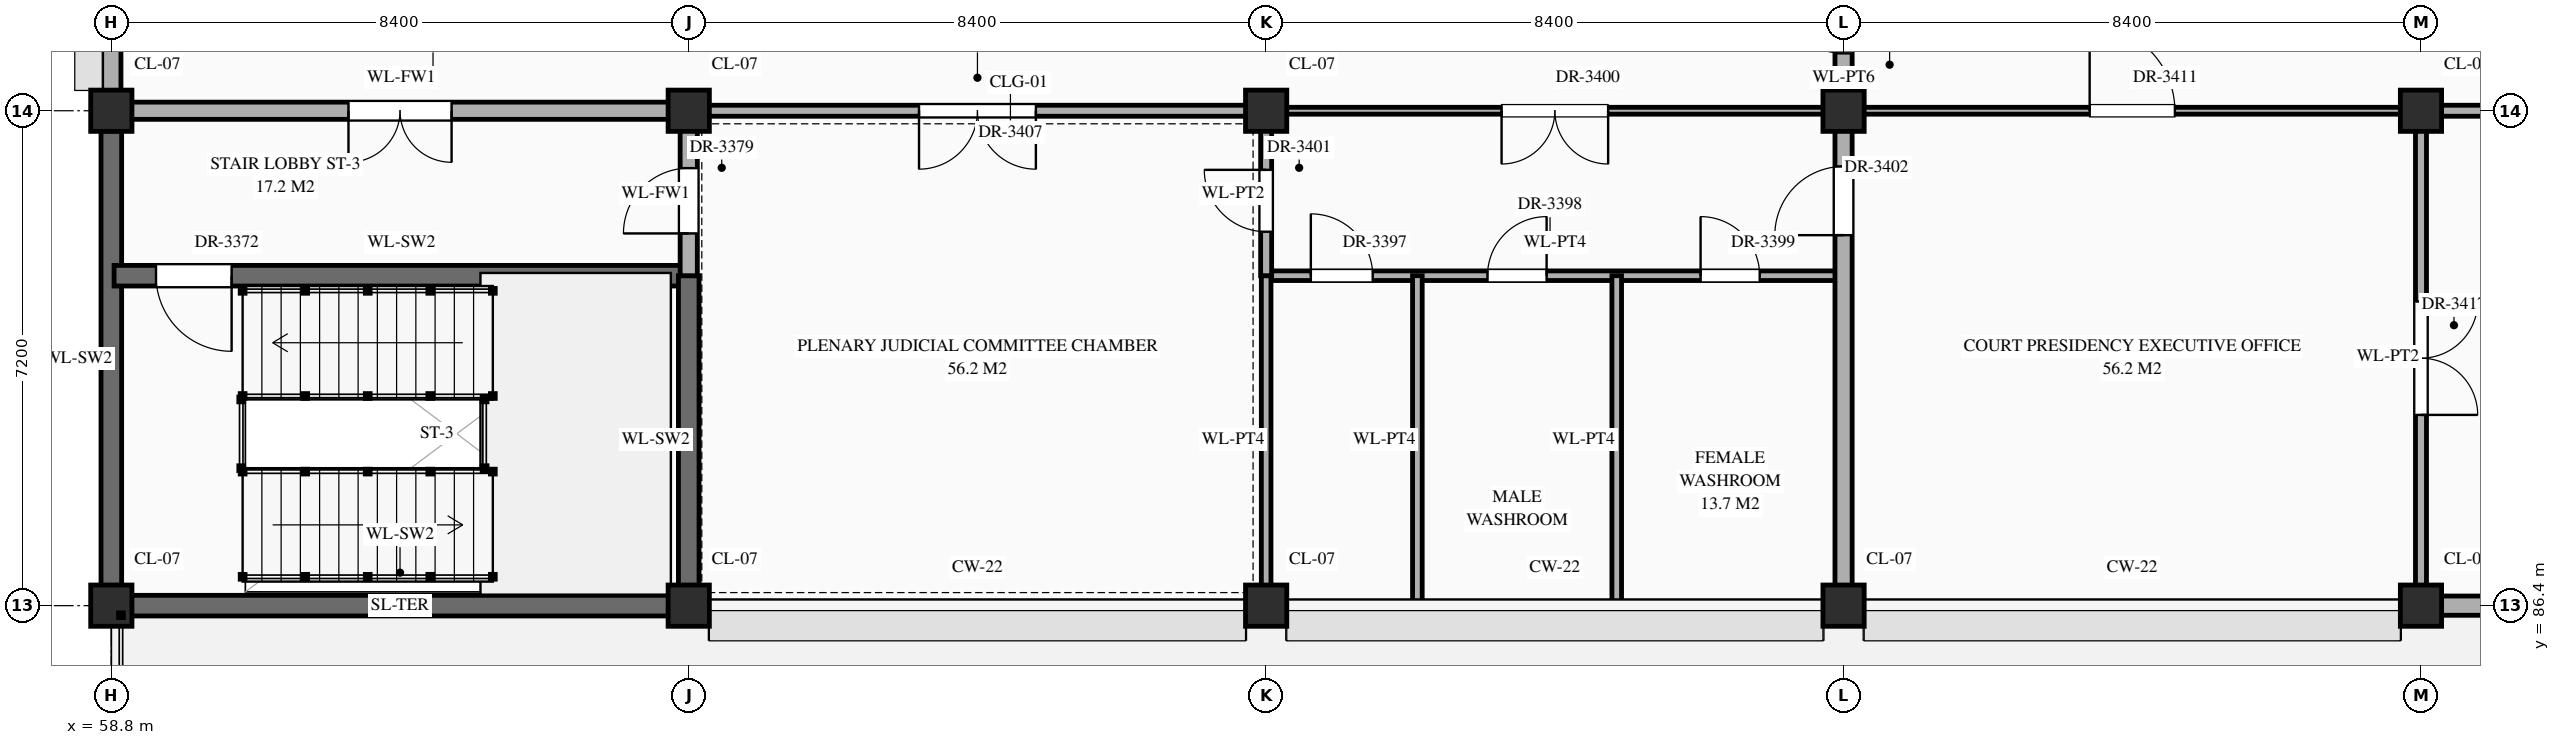
"""IFC4 building model, lengths in metres.
Left out: names, types, materials, properties, quantities, classifications, styles, units other than length and angle.
Written with IfcOpenShell. Run it as: python <this file> out.ifc"""

import sys

from ifc_helpers import new_model, si_unit, direction, frame, frame_2d, origin, origin_2d, place, context, subcontext, project, spatial, rectangle, extrude, element, fill, save


model = new_model("IFC4")
c1 = context("Model", 3, precision=1e-05, world=origin(), true_north=direction((0.0, 1.0)))
c2 = subcontext(c1, "Body", "Model", "MODEL_VIEW")
j1 = project(units=[si_unit("LENGTHUNIT", "METRE"), si_unit("PLANEANGLEUNIT", "RADIAN")], contexts=[c1])
p1 = place(None, origin())
s1 = spatial("IfcSite", under=j1, at=p1, CompositionType="ELEMENT")
p2 = place(p1, origin())
s2 = spatial("IfcBuilding", under=s1, at=p2, CompositionType="ELEMENT")
p3 = place(p2, frame((0.0, 0.0, 68.7)))
s3 = spatial("IfcBuildingStorey", under=s2, at=p3, CompositionType="ELEMENT", Elevation=68.7)
for number, where, z_axis, x_axis in (
    (1, (58.8, 86.4, 0.0), (0.0, 0.0, 1.0), (1.0, 0.0, 0.0)),
    (2, (58.8, 93.6, 0.0), (0.0, 0.0, 1.0), (1.0, 0.0, 0.0)),
    (3, (67.2, 86.4, 0.0), (0.0, 0.0, 1.0), (1.0, 0.0, 0.0)),
    (4, (67.2, 93.6, 0.0), (0.0, 0.0, 1.0), (1.0, 0.0, 0.0)),
    (5, (75.6, 86.4, 0.0), (0.0, 0.0, 1.0), (1.0, 0.0, 0.0)),
    (6, (75.6, 93.6, 0.0), (0.0, 0.0, 1.0), (1.0, 0.0, 0.0)),
    (7, (84.0, 86.4, 0.0), (0.0, 0.0, 1.0), (1.0, 0.0, 0.0)),
    (8, (84.0, 93.6, 0.0), (0.0, 0.0, 1.0), (1.0, 0.0, 0.0)),
    (9, (92.4, 86.4, 0.0), (0.0, 0.0, 1.0), (1.0, 0.0, 0.0)),
    (10, (92.4, 93.6, 0.0), (0.0, 0.0, 1.0), (1.0, 0.0, 0.0)),
):
    element("IfcColumn", number, at=place(p3, frame(where, z_axis=z_axis, x_axis=x_axis)), inside=s3, PredefinedType="COLUMN", context=c2, shape_type="SweptSolid", body=[
        extrude(rectangle(XDim=0.6, YDim=0.6, at=origin_2d()), origin(), (0.0, 0.0, 1.0), 4.5),
    ])
p4 = place(p3, frame((59.095, 86.4, 0.0), z_axis=(0.0, 0.0, 1.0), x_axis=(1.0, 0.0, 0.0)))
e11 = element("IfcWall", 11, at=p4, inside=s3, PredefinedType="SHEAR", context=c2, shape_type="SweptSolid", body=[
    extrude(rectangle(XDim=7.81, YDim=0.3, at=frame_2d((3.905, 0.0))), origin(), (0.0, 0.0, 1.0), 4.12),
])
p5 = place(p3, frame((58.8, 86.695, 0.0), z_axis=(0.0, 0.0, 1.0), x_axis=(0.0, 1.0, 0.0)))
e12 = element("IfcWall", 12, at=p5, inside=s3, PredefinedType="SHEAR", context=c2, shape_type="SweptSolid", body=[
    extrude(rectangle(XDim=6.61, YDim=0.3, at=frame_2d((3.305, 0.0))), origin(), (0.0, 0.0, 1.0), 4.12),
])
p6 = place(p3, frame((58.8, 93.895, 0.0), z_axis=(0.0, 0.0, 1.0), x_axis=(0.0, 1.0, 0.0)))
e13 = element("IfcWall", 13, at=p6, inside=s3, PredefinedType="STANDARD", context=c2, shape_type="SweptSolid", body=[
    extrude(rectangle(XDim=6.61, YDim=0.28, at=frame_2d((3.305, 0.0))), origin(), (0.0, 0.0, 1.0), 3.47),
])
p7 = place(p6, frame((4.005, 0.0, 0.85)))
e14 = element("IfcOpeningElement", 14, at=p7, cuts=e13, PredefinedType="OPENING", context=c2, shape_type="SweptSolid", body=[
    extrude(rectangle(XDim=1.2, YDim=1.56, at=frame_2d((0.6, 0.78))), frame((0.0, 0.152, 0.0), z_axis=(0.0, -1.0, 0.0), x_axis=(1.0, 0.0, 0.0)), (0.0, 0.0, 1.0), 0.304),
])
p8 = place(p3, frame((92.695, 86.4, 0.0), z_axis=(0.0, 0.0, 1.0), x_axis=(1.0, 0.0, 0.0)))
e15 = element("IfcWall", 15, at=p8, inside=s3, PredefinedType="STANDARD", context=c2, shape_type="SweptSolid", body=[
    extrude(rectangle(XDim=7.81, YDim=0.28, at=frame_2d((3.905, 0.0))), origin(), (0.0, 0.0, 1.0), 3.47),
])
p9 = place(p8, frame((3.005, 0.0, 0.0)))
e16 = element("IfcOpeningElement", 16, at=p9, cuts=e15, PredefinedType="OPENING", context=c2, shape_type="SweptSolid", body=[
    extrude(rectangle(XDim=1.8, YDim=2.25, at=frame_2d((0.9, 1.125))), frame((0.0, 0.152, 0.0), z_axis=(0.0, -1.0, 0.0), x_axis=(1.0, 0.0, 0.0)), (0.0, 0.0, 1.0), 0.304),
])
p10 = place(p3, frame((58.84, 91.2, 0.0), z_axis=(0.0, 0.0, 1.0), x_axis=(1.0, 0.0, 0.0)))
e17 = element("IfcWall", 17, at=p10, inside=s3, PredefinedType="SHEAR", context=c2, shape_type="SweptSolid", body=[
    extrude(rectangle(XDim=8.36, YDim=0.3, at=frame_2d((4.18, 0.0))), origin(), (0.0, 0.0, 1.0), 4.12),
])
p11 = place(p10, frame((0.61, 0.0, 0.0)))
e18 = element("IfcOpeningElement", 18, at=p11, cuts=e17, PredefinedType="OPENING", context=c2, shape_type="SweptSolid", body=[
    extrude(rectangle(XDim=1.1, YDim=2.2, at=frame_2d((0.55, 1.1))), frame((0.0, 0.162, 0.0), z_axis=(0.0, -1.0, 0.0), x_axis=(1.0, 0.0, 0.0)), (0.0, 0.0, 1.0), 0.324),
])
p12 = place(p3, frame((75.6, 91.2, 0.0), z_axis=(0.0, 0.0, 1.0), x_axis=(1.0, 0.0, 0.0)))
e19 = element("IfcWall", 19, at=p12, inside=s3, PredefinedType="STANDARD", context=c2, shape_type="SweptSolid", body=[
    extrude(rectangle(XDim=8.4, YDim=0.14, at=frame_2d((4.2, 0.0))), origin(), (0.0, 0.0, 1.0), 4.12),
])
p13 = place(p12, frame((0.65, 0.0, 0.0)))
e20 = element("IfcOpeningElement", 20, at=p13, cuts=e19, PredefinedType="OPENING", context=c2, shape_type="SweptSolid", body=[
    extrude(rectangle(XDim=0.9, YDim=2.15, at=frame_2d((0.45, 1.075))), frame((0.0, 0.082, 0.0), z_axis=(0.0, -1.0, 0.0), x_axis=(1.0, 0.0, 0.0)), (0.0, 0.0, 1.0), 0.164),
])
p14 = place(p12, frame((3.22, 0.0, 0.0)))
e21 = element("IfcOpeningElement", 21, at=p14, cuts=e19, PredefinedType="OPENING", context=c2, shape_type="SweptSolid", body=[
    extrude(rectangle(XDim=0.86, YDim=2.1, at=frame_2d((0.43, 1.05))), frame((0.0, 0.082, 0.0), z_axis=(0.0, -1.0, 0.0), x_axis=(1.0, 0.0, 0.0)), (0.0, 0.0, 1.0), 0.164),
])
p15 = place(p12, frame((6.32, 0.0, 0.0)))
e22 = element("IfcOpeningElement", 22, at=p15, cuts=e19, PredefinedType="OPENING", context=c2, shape_type="SweptSolid", body=[
    extrude(rectangle(XDim=0.86, YDim=2.1, at=frame_2d((0.43, 1.05))), frame((0.0, 0.082, 0.0), z_axis=(0.0, -1.0, 0.0), x_axis=(1.0, 0.0, 0.0)), (0.0, 0.0, 1.0), 0.164),
])
p16 = place(p3, frame((58.84, 93.6, 0.0), z_axis=(0.0, 0.0, 1.0), x_axis=(1.0, 0.0, 0.0)))
e23 = element("IfcWall", 23, at=p16, inside=s3, PredefinedType="STANDARD", context=c2, shape_type="SweptSolid", body=[
    extrude(rectangle(XDim=8.36, YDim=0.25, at=frame_2d((4.18, 0.0))), origin(), (0.0, 0.0, 1.0), 3.27),
])
p17 = place(p16, frame((3.41, 0.0, 0.0)))
e24 = element("IfcOpeningElement", 24, at=p17, cuts=e23, PredefinedType="OPENING", context=c2, shape_type="SweptSolid", body=[
    extrude(rectangle(XDim=1.5, YDim=2.25, at=frame_2d((0.75, 1.125))), frame((0.0, 0.137, 0.0), z_axis=(0.0, -1.0, 0.0), x_axis=(1.0, 0.0, 0.0)), (0.0, 0.0, 1.0), 0.274),
])
p18 = place(p3, frame((67.2, 93.6, 0.0), z_axis=(0.0, 0.0, 1.0), x_axis=(1.0, 0.0, 0.0)))
e25 = element("IfcWall", 25, at=p18, inside=s3, PredefinedType="STANDARD", context=c2, shape_type="SweptSolid", body=[
    extrude(rectangle(XDim=8.4, YDim=0.16, at=frame_2d((4.2, 0.0))), origin(), (0.0, 0.0, 1.0), 3.27),
])
p19 = place(p18, frame((3.35, 0.0, 0.0)))
e26 = element("IfcOpeningElement", 26, at=p19, cuts=e25, PredefinedType="OPENING", context=c2, shape_type="SweptSolid", body=[
    extrude(rectangle(XDim=1.7, YDim=2.45, at=frame_2d((0.85, 1.225))), frame((0.0, 0.092, 0.0), z_axis=(0.0, -1.0, 0.0), x_axis=(1.0, 0.0, 0.0)), (0.0, 0.0, 1.0), 0.184),
])
p20 = place(p3, frame((75.6, 93.6, 0.0), z_axis=(0.0, 0.0, 1.0), x_axis=(1.0, 0.0, 0.0)))
e27 = element("IfcWall", 27, at=p20, inside=s3, PredefinedType="STANDARD", context=c2, shape_type="SweptSolid", body=[
    extrude(rectangle(XDim=16.8, YDim=0.1, at=frame_2d((8.4, 0.0))), origin(), (0.0, 0.0, 1.0), 3.27),
])
p21 = place(p20, frame((3.425, 0.0, 0.0)))
e28 = element("IfcOpeningElement", 28, at=p21, cuts=e27, PredefinedType="OPENING", context=c2, shape_type="SweptSolid", body=[
    extrude(rectangle(XDim=1.55, YDim=2.35, at=frame_2d((0.775, 1.175))), frame((0.0, 0.062, 0.0), z_axis=(0.0, -1.0, 0.0), x_axis=(1.0, 0.0, 0.0)), (0.0, 0.0, 1.0), 0.124),
])
p22 = place(p20, frame((11.98, 0.0, 0.0)))
e29 = element("IfcOpeningElement", 29, at=p22, cuts=e27, PredefinedType="OPENING", context=c2, shape_type="SweptSolid", body=[
    extrude(rectangle(XDim=1.24, YDim=2.3, at=frame_2d((0.62, 1.15))), frame((0.0, 0.062, 0.0), z_axis=(0.0, -1.0, 0.0), x_axis=(1.0, 0.0, 0.0)), (0.0, 0.0, 1.0), 0.124),
])
p23 = place(p3, frame((92.4, 93.6, 0.0), z_axis=(0.0, 0.0, 1.0), x_axis=(1.0, 0.0, 0.0)))
e30 = element("IfcWall", 30, at=p23, inside=s3, PredefinedType="STANDARD", context=c2, shape_type="SweptSolid", body=[
    extrude(rectangle(XDim=8.4, YDim=0.16, at=frame_2d((4.2, 0.0))), origin(), (0.0, 0.0, 1.0), 3.27),
])
p24 = place(p23, frame((3.425, 0.0, 0.0)))
e31 = element("IfcOpeningElement", 31, at=p24, cuts=e30, PredefinedType="OPENING", context=c2, shape_type="SweptSolid", body=[
    extrude(rectangle(XDim=1.55, YDim=2.35, at=frame_2d((0.775, 1.175))), frame((0.0, 0.092, 0.0), z_axis=(0.0, -1.0, 0.0), x_axis=(1.0, 0.0, 0.0)), (0.0, 0.0, 1.0), 0.184),
])
p25 = place(p3, frame((67.2, 86.44, 0.0), z_axis=(0.0, 0.0, 1.0), x_axis=(0.0, 1.0, 0.0)))
e32 = element("IfcWall", 32, at=p25, inside=s3, PredefinedType="SHEAR", context=c2, shape_type="SweptSolid", body=[
    extrude(rectangle(XDim=4.76, YDim=0.3, at=frame_2d((2.38, 0.0))), origin(), (0.0, 0.0, 1.0), 4.12),
])
p26 = place(p3, frame((67.2, 91.2, 0.0), z_axis=(0.0, 0.0, 1.0), x_axis=(0.0, 1.0, 0.0)))
e33 = element("IfcWall", 33, at=p26, inside=s3, PredefinedType="STANDARD", context=c2, shape_type="SweptSolid", body=[
    extrude(rectangle(XDim=2.4, YDim=0.25, at=frame_2d((1.2, 0.0))), origin(), (0.0, 0.0, 1.0), 3.37),
])
p27 = place(p26, frame((0.615, 0.0, 0.0)))
e34 = element("IfcOpeningElement", 34, at=p27, cuts=e33, PredefinedType="OPENING", context=c2, shape_type="SweptSolid", body=[
    extrude(rectangle(XDim=0.95, YDim=2.15, at=frame_2d((0.475, 1.075))), frame((0.0, 0.137, 0.0), z_axis=(0.0, -1.0, 0.0), x_axis=(1.0, 0.0, 0.0)), (0.0, 0.0, 1.0), 0.274),
])
p28 = place(p3, frame((75.6, 86.44, 0.0), z_axis=(0.0, 0.0, 1.0), x_axis=(0.0, 1.0, 0.0)))
e35 = element("IfcWall", 35, at=p28, inside=s3, PredefinedType="STANDARD", context=c2, shape_type="SweptSolid", body=[
    extrude(rectangle(XDim=4.76, YDim=0.14, at=frame_2d((2.38, 0.0))), origin(), (0.0, 0.0, 1.0), 3.37),
])
p29 = place(p3, frame((75.6, 91.2, 0.0), z_axis=(0.0, 0.0, 1.0), x_axis=(0.0, 1.0, 0.0)))
e36 = element("IfcWall", 36, at=p29, inside=s3, PredefinedType="STANDARD", context=c2, shape_type="SweptSolid", body=[
    extrude(rectangle(XDim=2.4, YDim=0.16, at=frame_2d((1.2, 0.0))), origin(), (0.0, 0.0, 1.0), 3.37),
])
p30 = place(p29, frame((0.64, 0.0, 0.0)))
e37 = element("IfcOpeningElement", 37, at=p30, cuts=e36, PredefinedType="OPENING", context=c2, shape_type="SweptSolid", body=[
    extrude(rectangle(XDim=0.9, YDim=2.15, at=frame_2d((0.45, 1.075))), frame((0.0, 0.092, 0.0), z_axis=(0.0, -1.0, 0.0), x_axis=(1.0, 0.0, 0.0)), (0.0, 0.0, 1.0), 0.184),
])
for number, where, z_axis, x_axis in (
    (38, (77.8, 86.44, 0.0), (0.0, 0.0, 1.0), (0.0, 1.0, 0.0)),
    (39, (80.7, 86.44, 0.0), (0.0, 0.0, 1.0), (0.0, 1.0, 0.0)),
):
    element("IfcWall", number, at=place(p3, frame(where, z_axis=z_axis, x_axis=x_axis)), inside=s3, PredefinedType="STANDARD", context=c2, shape_type="SweptSolid", body=[
        extrude(rectangle(XDim=4.76, YDim=0.14, at=frame_2d((2.38, 0.0))), origin(), (0.0, 0.0, 1.0), 4.12),
    ])
p31 = place(p3, frame((84.0, 86.44, 0.0), z_axis=(0.0, 0.0, 1.0), x_axis=(0.0, 1.0, 0.0)))
e40 = element("IfcWall", 40, at=p31, inside=s3, PredefinedType="STANDARD", context=c2, shape_type="SweptSolid", body=[
    extrude(rectangle(XDim=17.96, YDim=0.25, at=frame_2d((8.98, 0.0))), origin(), (0.0, 0.0, 1.0), 3.37),
])
p32 = place(p31, frame((15.52, 0.0, 0.0)))
e41 = element("IfcOpeningElement", 41, at=p32, cuts=e40, PredefinedType="OPENING", context=c2, shape_type="SweptSolid", body=[
    extrude(rectangle(XDim=1.5, YDim=2.25, at=frame_2d((0.75, 1.125))), frame((0.0, 0.137, 0.0), z_axis=(0.0, -1.0, 0.0), x_axis=(1.0, 0.0, 0.0)), (0.0, 0.0, 1.0), 0.274),
])
p33 = place(p31, frame((5.35, 0.0, 0.0)))
e42 = element("IfcOpeningElement", 42, at=p33, cuts=e40, PredefinedType="OPENING", context=c2, shape_type="SweptSolid", body=[
    extrude(rectangle(XDim=1.0, YDim=2.2, at=frame_2d((0.5, 1.1))), frame((0.0, 0.137, 0.0), z_axis=(0.0, -1.0, 0.0), x_axis=(1.0, 0.0, 0.0)), (0.0, 0.0, 1.0), 0.274),
])
p34 = place(p31, frame((7.995, 0.0, 0.0)))
e43 = element("IfcOpeningElement", 43, at=p34, cuts=e40, PredefinedType="OPENING", context=c2, shape_type="SweptSolid", body=[
    extrude(rectangle(XDim=0.95, YDim=2.15, at=frame_2d((0.475, 1.075))), frame((0.0, 0.137, 0.0), z_axis=(0.0, -1.0, 0.0), x_axis=(1.0, 0.0, 0.0)), (0.0, 0.0, 1.0), 0.274),
])
p35 = place(p3, frame((92.4, 86.44, 0.0), z_axis=(0.0, 0.0, 1.0), x_axis=(0.0, 1.0, 0.0)))
e44 = element("IfcWall", 44, at=p35, inside=s3, PredefinedType="STANDARD", context=c2, shape_type="SweptSolid", body=[
    extrude(rectangle(XDim=7.16, YDim=0.16, at=frame_2d((3.58, 0.0))), origin(), (0.0, 0.0, 1.0), 3.37),
])
p36 = place(p35, frame((2.735, 0.0, 0.0)))
e45 = element("IfcOpeningElement", 45, at=p36, cuts=e44, PredefinedType="OPENING", context=c2, shape_type="SweptSolid", body=[
    extrude(rectangle(XDim=1.65, YDim=2.4, at=frame_2d((0.825, 1.2))), frame((0.0, 0.092, 0.0), z_axis=(0.0, -1.0, 0.0), x_axis=(1.0, 0.0, 0.0)), (0.0, 0.0, 1.0), 0.184),
])
p37 = place(p11, frame((1.1, 0.0, 0.0), z_axis=(0.0, 0.0, 1.0), x_axis=(-1.0, 0.0, 0.0)))
e46 = element("IfcDoor", 46, at=p37, inside=s3, OperationType="SINGLE_SWING_LEFT", PredefinedType="DOOR", context=c2, shape_type="SweptSolid", body=[
    extrude(rectangle(XDim=1.1, YDim=2.2, at=frame_2d((0.55, 1.1))), frame((0.0, 0.025, 0.0), z_axis=(0.0, -1.0, 0.0), x_axis=(1.0, 0.0, 0.0)), (0.0, 0.0, 1.0), 0.05),
])
fill(e18, e46)
p38 = place(p17, frame((1.5, 0.0, 0.0), z_axis=(0.0, 0.0, 1.0), x_axis=(-1.0, 0.0, 0.0)))
e47 = element("IfcDoor", 47, at=p38, inside=s3, OperationType="DOUBLE_DOOR_SINGLE_SWING", PredefinedType="DOOR", context=c2, shape_type="SweptSolid", body=[
    extrude(rectangle(XDim=1.5, YDim=2.25, at=frame_2d((0.75, 1.125))), frame((0.0, 0.025, 0.0), z_axis=(0.0, -1.0, 0.0), x_axis=(1.0, 0.0, 0.0)), (0.0, 0.0, 1.0), 0.05),
])
fill(e24, e47)
p39 = place(p27, origin())
e48 = element("IfcDoor", 48, at=p39, inside=s3, OperationType="SINGLE_SWING_LEFT", PredefinedType="DOOR", context=c2, shape_type="SweptSolid", body=[
    extrude(rectangle(XDim=0.95, YDim=2.15, at=frame_2d((0.475, 1.075))), frame((0.0, 0.025, 0.0), z_axis=(0.0, -1.0, 0.0), x_axis=(1.0, 0.0, 0.0)), (0.0, 0.0, 1.0), 0.05),
])
fill(e34, e48)
p40 = place(p13, origin())
e49 = element("IfcDoor", 49, at=p40, inside=s3, OperationType="SINGLE_SWING_LEFT", PredefinedType="DOOR", context=c2, shape_type="SweptSolid", body=[
    extrude(rectangle(XDim=0.9, YDim=2.15, at=frame_2d((0.45, 1.075))), frame((0.0, 0.025, 0.0), z_axis=(0.0, -1.0, 0.0), x_axis=(1.0, 0.0, 0.0)), (0.0, 0.0, 1.0), 0.05),
])
fill(e20, e49)
p41 = place(p14, origin())
e50 = element("IfcDoor", 50, at=p41, inside=s3, OperationType="SINGLE_SWING_RIGHT", PredefinedType="DOOR", context=c2, shape_type="SweptSolid", body=[
    extrude(rectangle(XDim=0.86, YDim=2.1, at=frame_2d((0.43, 1.05))), frame((0.0, 0.025, 0.0), z_axis=(0.0, -1.0, 0.0), x_axis=(1.0, 0.0, 0.0)), (0.0, 0.0, 1.0), 0.05),
])
fill(e21, e50)
p42 = place(p15, origin())
e51 = element("IfcDoor", 51, at=p42, inside=s3, OperationType="SINGLE_SWING_LEFT", PredefinedType="DOOR", context=c2, shape_type="SweptSolid", body=[
    extrude(rectangle(XDim=0.86, YDim=2.1, at=frame_2d((0.43, 1.05))), frame((0.0, 0.025, 0.0), z_axis=(0.0, -1.0, 0.0), x_axis=(1.0, 0.0, 0.0)), (0.0, 0.0, 1.0), 0.05),
])
fill(e22, e51)
p43 = place(p21, frame((1.55, 0.0, 0.0), z_axis=(0.0, 0.0, 1.0), x_axis=(-1.0, 0.0, 0.0)))
e52 = element("IfcDoor", 52, at=p43, inside=s3, OperationType="DOUBLE_DOOR_SINGLE_SWING", PredefinedType="DOOR", context=c2, shape_type="SweptSolid", body=[
    extrude(rectangle(XDim=1.55, YDim=2.35, at=frame_2d((0.775, 1.175))), frame((0.0, 0.025, 0.0), z_axis=(0.0, -1.0, 0.0), x_axis=(1.0, 0.0, 0.0)), (0.0, 0.0, 1.0), 0.05),
])
fill(e28, e52)
p44 = place(p30, origin())
e53 = element("IfcDoor", 53, at=p44, inside=s3, OperationType="SINGLE_SWING_RIGHT", PredefinedType="DOOR", context=c2, shape_type="SweptSolid", body=[
    extrude(rectangle(XDim=0.9, YDim=2.15, at=frame_2d((0.45, 1.075))), frame((0.0, 0.025, 0.0), z_axis=(0.0, -1.0, 0.0), x_axis=(1.0, 0.0, 0.0)), (0.0, 0.0, 1.0), 0.05),
])
fill(e37, e53)
p45 = place(p33, origin())
e54 = element("IfcDoor", 54, at=p45, inside=s3, OperationType="SINGLE_SWING_LEFT", PredefinedType="DOOR", context=c2, shape_type="SweptSolid", body=[
    extrude(rectangle(XDim=1.0, YDim=2.2, at=frame_2d((0.5, 1.1))), frame((0.0, 0.025, 0.0), z_axis=(0.0, -1.0, 0.0), x_axis=(1.0, 0.0, 0.0)), (0.0, 0.0, 1.0), 0.05),
])
fill(e42, e54)
p46 = place(p34, origin())
e55 = element("IfcDoor", 55, at=p46, inside=s3, OperationType="SINGLE_SWING_RIGHT", PredefinedType="DOOR", context=c2, shape_type="SweptSolid", body=[
    extrude(rectangle(XDim=0.95, YDim=2.15, at=frame_2d((0.475, 1.075))), frame((0.0, 0.025, 0.0), z_axis=(0.0, -1.0, 0.0), x_axis=(1.0, 0.0, 0.0)), (0.0, 0.0, 1.0), 0.05),
])
fill(e43, e55)
p47 = place(p19, frame((1.7, 0.0, 0.0), z_axis=(0.0, 0.0, 1.0), x_axis=(-1.0, 0.0, 0.0)))
e56 = element("IfcDoor", 56, at=p47, inside=s3, OperationType="DOUBLE_DOOR_SINGLE_SWING", PredefinedType="DOOR", context=c2, shape_type="SweptSolid", body=[
    extrude(rectangle(XDim=1.7, YDim=2.45, at=frame_2d((0.85, 1.225))), frame((0.0, 0.025, 0.0), z_axis=(0.0, -1.0, 0.0), x_axis=(1.0, 0.0, 0.0)), (0.0, 0.0, 1.0), 0.05),
])
fill(e26, e56)
p48 = place(p22, origin())
e57 = element("IfcDoor", 57, at=p48, inside=s3, OperationType="SINGLE_SWING_LEFT", PredefinedType="DOOR", context=c2, shape_type="SweptSolid", body=[
    extrude(rectangle(XDim=1.24, YDim=2.3, at=frame_2d((0.62, 1.15))), frame((0.0, 0.025, 0.0), z_axis=(0.0, -1.0, 0.0), x_axis=(1.0, 0.0, 0.0)), (0.0, 0.0, 1.0), 0.05),
])
fill(e29, e57)
p49 = place(p36, frame((1.65, 0.0, 0.0), z_axis=(0.0, 0.0, 1.0), x_axis=(-1.0, 0.0, 0.0)))
e58 = element("IfcDoor", 58, at=p49, inside=s3, OperationType="DOUBLE_DOOR_SINGLE_SWING", PredefinedType="DOOR", context=c2, shape_type="SweptSolid", body=[
    extrude(rectangle(XDim=1.65, YDim=2.4, at=frame_2d((0.825, 1.2))), frame((0.0, 0.025, 0.0), z_axis=(0.0, -1.0, 0.0), x_axis=(1.0, 0.0, 0.0)), (0.0, 0.0, 1.0), 0.05),
])
fill(e45, e58)
save(model, sys.argv[1])
